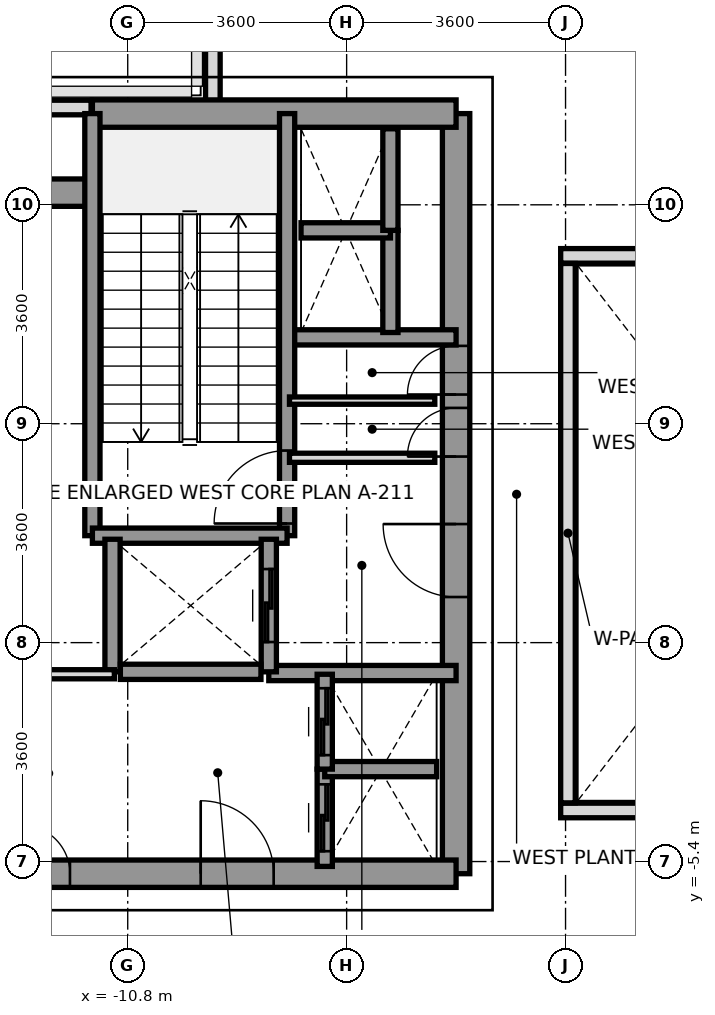
"""IFC4 building model, lengths in metres.
Left out: names, types, materials, properties, quantities, classifications, styles, units other than length and angle.
Written with IfcOpenShell. Run it as: python <this file> out.ifc"""

import sys

from ifc_helpers import new_model, si_unit, direction, frame, frame_2d, origin, place, context, subcontext, project, spatial, rectangle, extrude, source, transform, mapped, element, fill, save


model = new_model("IFC4")
c1 = context("Model", 3, precision=1e-05, world=origin(), true_north=direction((0.0, 1.0)))
c2 = subcontext(c1, "Body", "Model", "MODEL_VIEW")
j1 = project(units=[si_unit("LENGTHUNIT", "METRE"), si_unit("PLANEANGLEUNIT", "RADIAN")], contexts=[c1])
p1 = place(None, origin())
s1 = spatial("IfcSite", under=j1, at=p1, CompositionType="ELEMENT")
p2 = place(p1, origin())
s2 = spatial("IfcBuilding", under=s1, at=p2, CompositionType="ELEMENT")
p3 = place(p2, frame((0.0, 0.0, 151.6)))
s3 = spatial("IfcBuildingStorey", under=s2, at=p3, CompositionType="ELEMENT", Elevation=151.6)
p4 = place(p3, frame((-14.072, 7.0, 0.0), z_axis=(0.0, 0.0, 1.0), x_axis=(1.0, 0.0, 0.0)))
e1 = element("IfcWall", 1, at=p4, inside=s3, PredefinedType="PARAPET", context=c2, shape_type="SweptSolid", body=[
    extrude(rectangle(XDim=2.669, YDim=0.24, at=frame_2d((1.334, 0.0))), origin(), (0.0, 0.0, 1.0), 1.15),
])
p5 = place(p3, frame((-9.4, 6.953, 0.0), z_axis=(0.0, 0.0, 1.0), x_axis=(0.0, 1.0, 0.0)))
e2 = element("IfcWall", 2, at=p5, inside=s3, PredefinedType="PARAPET", context=c2, shape_type="SweptSolid", body=[
    extrude(rectangle(XDim=1.519, YDim=0.24, at=frame_2d((0.76, 0.0))), origin(), (0.0, 0.0, 1.0), 1.15),
])
p6 = place(p3, frame((-5.4, -5.6, 0.0), z_axis=(0.0, 0.0, 1.0), x_axis=(0.0, 1.0, 0.0)))
e3 = element("IfcWall", 3, at=p6, inside=s3, PredefinedType="SHEAR", context=c2, shape_type="SweptSolid", body=[
    extrude(rectangle(XDim=12.5, YDim=0.45, at=frame_2d((6.25, 0.0))), origin(), (0.0, 0.0, 1.0), 4.4),
])
p7 = place(p6, frame((4.55, 0.0, 0.0)))
e4 = element("IfcOpeningElement", 4, at=p7, cuts=e3, PredefinedType="OPENING", context=c2, shape_type="SweptSolid", body=[
    extrude(rectangle(XDim=1.2, YDim=2.2, at=frame_2d((0.6, 1.1))), frame((0.0, 0.235, 0.0), z_axis=(0.0, -1.0, 0.0), x_axis=(1.0, 0.0, 0.0)), (0.0, 0.0, 1.0), 0.47),
])
p8 = place(p6, frame((6.86, 0.0, 0.0)))
e5 = element("IfcOpeningElement", 5, at=p8, cuts=e3, PredefinedType="OPENING", context=c2, shape_type="SweptSolid", body=[
    extrude(rectangle(XDim=0.8, YDim=2.1, at=frame_2d((0.4, 1.05))), frame((0.0, 0.235, 0.0), z_axis=(0.0, -1.0, 0.0), x_axis=(1.0, 0.0, 0.0)), (0.0, 0.0, 1.0), 0.47),
])
p9 = place(p6, frame((7.88, 0.0, 0.0)))
e6 = element("IfcOpeningElement", 6, at=p9, cuts=e3, PredefinedType="OPENING", context=c2, shape_type="SweptSolid", body=[
    extrude(rectangle(XDim=0.8, YDim=2.1, at=frame_2d((0.4, 1.05))), frame((0.0, 0.235, 0.0), z_axis=(0.0, -1.0, 0.0), x_axis=(1.0, 0.0, 0.0)), (0.0, 0.0, 1.0), 0.47),
])
p10 = place(p3, frame((-11.381, 6.9, 0.0), z_axis=(0.0, 0.0, 1.0), x_axis=(1.0, 0.0, 0.0)))
e7 = element("IfcWall", 7, at=p10, inside=s3, PredefinedType="SHEAR", context=c2, shape_type="SweptSolid", body=[
    extrude(rectangle(XDim=5.981, YDim=0.45, at=frame_2d((2.991, 0.0))), origin(), (0.0, 0.0, 1.0), 4.4),
])
p11 = place(p3, frame((-13.2, 5.6, 0.0), z_axis=(0.0, 0.0, 1.0), x_axis=(1.0, 0.0, 0.0)))
e8 = element("IfcWall", 8, at=p11, inside=s3, PredefinedType="SHEAR", context=c2, shape_type="SweptSolid", body=[
    extrude(rectangle(XDim=1.819, YDim=0.45, at=frame_2d((0.909, 0.0))), origin(), (0.0, 0.0, 1.0), 4.4),
])
p12 = place(p3, frame((-13.2, -5.6, 0.0), z_axis=(0.0, 0.0, 1.0), x_axis=(1.0, 0.0, 0.0)))
e9 = element("IfcWall", 9, at=p12, inside=s3, PredefinedType="SHEAR", context=c2, shape_type="SweptSolid", body=[
    extrude(rectangle(XDim=7.8, YDim=0.45, at=frame_2d((3.9, 0.0))), origin(), (0.0, 0.0, 1.0), 4.4),
])
p13 = place(p12, frame((3.6, 0.0, 0.0)))
e10 = element("IfcOpeningElement", 10, at=p13, cuts=e9, PredefinedType="OPENING", context=c2, shape_type="SweptSolid", body=[
    extrude(rectangle(XDim=1.2, YDim=2.2, at=frame_2d((0.6, 1.1))), frame((0.0, 0.235, 0.0), z_axis=(0.0, -1.0, 0.0), x_axis=(1.0, 0.0, 0.0)), (0.0, 0.0, 1.0), 0.47),
])
p14 = place(p12, frame((0.65, 0.0, 0.0)))
e11 = element("IfcOpeningElement", 11, at=p14, cuts=e9, PredefinedType="OPENING", context=c2, shape_type="SweptSolid", body=[
    extrude(rectangle(XDim=0.8, YDim=2.1, at=frame_2d((0.4, 1.05))), frame((0.0, 0.235, 0.0), z_axis=(0.0, -1.0, 0.0), x_axis=(1.0, 0.0, 0.0)), (0.0, 0.0, 1.0), 0.47),
])
p15 = place(p3, frame((-8.18, 3.22, 0.0), z_axis=(0.0, 0.0, 1.0), x_axis=(1.0, 0.0, 0.0)))
e12 = element("IfcWall", 12, at=p15, inside=s3, PredefinedType="SOLIDWALL", context=c2, shape_type="SweptSolid", body=[
    extrude(rectangle(XDim=2.78, YDim=0.25, at=frame_2d((1.39, 0.0))), origin(), (0.0, 0.0, 1.0), 4.4),
])
p16 = place(p3, frame((-8.48, -2.3, 0.0), z_axis=(0.0, 0.0, 1.0), x_axis=(1.0, 0.0, 0.0)))
e13 = element("IfcWall", 13, at=p16, inside=s3, PredefinedType="SOLIDWALL", context=c2, shape_type="SweptSolid", body=[
    extrude(rectangle(XDim=3.08, YDim=0.25, at=frame_2d((1.54, 0.0))), origin(), (0.0, 0.0, 1.0), 4.4),
])
p17 = place(p3, frame((-8.179, -0.041, 0.0), z_axis=(0.0, 0.0, 1.0), x_axis=(0.0, 1.0, 0.0)))
e14 = element("IfcWall", 14, at=p17, inside=s3, PredefinedType="SOLIDWALL", context=c2, shape_type="SweptSolid", body=[
    extrude(rectangle(XDim=6.941, YDim=0.25, at=frame_2d((3.47, 0.0))), origin(), (0.0, 0.0, 1.0), 4.4),
])
p18 = place(p17, frame((0.2, 0.0, 0.0)))
e15 = element("IfcOpeningElement", 15, at=p18, cuts=e14, PredefinedType="OPENING", context=c2, shape_type="SweptSolid", body=[
    extrude(rectangle(XDim=1.2, YDim=2.2, at=frame_2d((0.6, 1.1))), frame((0.0, 0.135, 0.0), z_axis=(0.0, -1.0, 0.0), x_axis=(1.0, 0.0, 0.0)), (0.0, 0.0, 1.0), 0.27),
])
p19 = place(p3, frame((-11.381, -0.041, 0.0), z_axis=(0.0, 0.0, 1.0), x_axis=(0.0, 1.0, 0.0)))
e16 = element("IfcWall", 16, at=p19, inside=s3, PredefinedType="SOLIDWALL", context=c2, shape_type="SweptSolid", body=[
    extrude(rectangle(XDim=6.941, YDim=0.25, at=frame_2d((3.47, 0.0))), origin(), (0.0, 0.0, 1.0), 4.4),
])
p20 = place(p3, frame((-11.381, -0.041, 0.0), z_axis=(0.0, 0.0, 1.0), x_axis=(1.0, 0.0, 0.0)))
e17 = element("IfcWall", 17, at=p20, inside=s3, PredefinedType="SOLIDWALL", context=c2, shape_type="SweptSolid", body=[
    extrude(rectangle(XDim=3.202, YDim=0.25, at=frame_2d((1.601, 0.0))), origin(), (0.0, 0.0, 1.0), 4.4),
])
p21 = place(p3, frame((-11.05, -2.28, 0.0), z_axis=(0.0, 0.0, 1.0), x_axis=(0.0, 1.0, 0.0)))
e18 = element("IfcWall", 18, at=p21, inside=s3, PredefinedType="SOLIDWALL", context=c2, shape_type="SweptSolid", body=[
    extrude(rectangle(XDim=2.18, YDim=0.25, at=frame_2d((1.09, 0.0))), origin(), (0.0, 0.0, 1.0), 4.4),
])
p22 = place(p3, frame((-8.48, -2.28, 0.0), z_axis=(0.0, 0.0, 1.0), x_axis=(0.0, 1.0, 0.0)))
e19 = element("IfcWall", 19, at=p22, inside=s3, PredefinedType="SOLIDWALL", context=c2, shape_type="SweptSolid", body=[
    extrude(rectangle(XDim=2.18, YDim=0.25, at=frame_2d((1.09, 0.0))), origin(), (0.0, 0.0, 1.0), 4.4),
])
p23 = place(p22, frame((0.49, 0.0, 0.0)))
e20 = element("IfcOpeningElement", 20, at=p23, cuts=e19, PredefinedType="OPENING", context=c2, shape_type="SweptSolid", body=[
    extrude(rectangle(XDim=1.2, YDim=2.2, at=frame_2d((0.6, 1.1))), frame((0.0, 0.135, 0.0), z_axis=(0.0, -1.0, 0.0), x_axis=(1.0, 0.0, 0.0)), (0.0, 0.0, 1.0), 0.27),
])
p24 = place(p3, frame((-10.921, -2.28, 0.0), z_axis=(0.0, 0.0, 1.0), x_axis=(1.0, 0.0, 0.0)))
e21 = element("IfcWall", 21, at=p24, inside=s3, PredefinedType="SOLIDWALL", context=c2, shape_type="SweptSolid", body=[
    extrude(rectangle(XDim=2.312, YDim=0.25, at=frame_2d((1.156, 0.0))), origin(), (0.0, 0.0, 1.0), 4.4),
])
p25 = place(p3, frame((-7.56, -5.48, 0.0), z_axis=(0.0, 0.0, 1.0), x_axis=(0.0, 1.0, 0.0)))
e22 = element("IfcWall", 22, at=p25, inside=s3, PredefinedType="SOLIDWALL", context=c2, shape_type="SweptSolid", body=[
    extrude(rectangle(XDim=1.6, YDim=0.25, at=frame_2d((0.8, 0.0))), origin(), (0.0, 0.0, 1.0), 4.4),
])
p26 = place(p25, frame((0.25, 0.0, 0.0)))
e23 = element("IfcOpeningElement", 23, at=p26, cuts=e22, PredefinedType="OPENING", context=c2, shape_type="SweptSolid", body=[
    extrude(rectangle(XDim=1.1, YDim=2.2, at=frame_2d((0.55, 1.1))), frame((0.0, 0.135, 0.0), z_axis=(0.0, -1.0, 0.0), x_axis=(1.0, 0.0, 0.0)), (0.0, 0.0, 1.0), 0.27),
])
p27 = place(p3, frame((-7.56, -3.88, 0.0), z_axis=(0.0, 0.0, 1.0), x_axis=(1.0, 0.0, 0.0)))
e24 = element("IfcWall", 24, at=p27, inside=s3, PredefinedType="SOLIDWALL", context=c2, shape_type="SweptSolid", body=[
    extrude(rectangle(XDim=1.84, YDim=0.25, at=frame_2d((0.92, 0.0))), origin(), (0.0, 0.0, 1.0), 4.4),
])
p28 = place(p3, frame((-7.56, -3.88, 0.0), z_axis=(0.0, 0.0, 1.0), x_axis=(0.0, 1.0, 0.0)))
e25 = element("IfcWall", 25, at=p28, inside=s3, PredefinedType="SOLIDWALL", context=c2, shape_type="SweptSolid", body=[
    extrude(rectangle(XDim=1.56, YDim=0.25, at=frame_2d((0.78, 0.0))), origin(), (0.0, 0.0, 1.0), 4.4),
])
p29 = place(p28, frame((0.23, 0.0, 0.0)))
e26 = element("IfcOpeningElement", 26, at=p29, cuts=e25, PredefinedType="OPENING", context=c2, shape_type="SweptSolid", body=[
    extrude(rectangle(XDim=1.1, YDim=2.2, at=frame_2d((0.55, 1.1))), frame((0.0, 0.135, 0.0), z_axis=(0.0, -1.0, 0.0), x_axis=(1.0, 0.0, 0.0)), (0.0, 0.0, 1.0), 0.27),
])
p30 = place(p3, frame((-6.48, 3.3, 0.0), z_axis=(0.0, 0.0, 1.0), x_axis=(0.0, 1.0, 0.0)))
e27 = element("IfcWall", 27, at=p30, inside=s3, PredefinedType="SOLIDWALL", context=c2, shape_type="SweptSolid", body=[
    extrude(rectangle(XDim=1.68, YDim=0.25, at=frame_2d((0.84, 0.0))), origin(), (0.0, 0.0, 1.0), 4.4),
])
p31 = place(p3, frame((-7.95, 4.98, 0.0), z_axis=(0.0, 0.0, 1.0), x_axis=(1.0, 0.0, 0.0)))
e28 = element("IfcWall", 28, at=p31, inside=s3, PredefinedType="SOLIDWALL", context=c2, shape_type="SweptSolid", body=[
    extrude(rectangle(XDim=1.47, YDim=0.25, at=frame_2d((0.735, 0.0))), origin(), (0.0, 0.0, 1.0), 4.4),
])
p32 = place(p3, frame((-6.48, 4.98, 0.0), z_axis=(0.0, 0.0, 1.0), x_axis=(0.0, 1.0, 0.0)))
e29 = element("IfcWall", 29, at=p32, inside=s3, PredefinedType="SOLIDWALL", context=c2, shape_type="SweptSolid", body=[
    extrude(rectangle(XDim=1.67, YDim=0.25, at=frame_2d((0.835, 0.0))), origin(), (0.0, 0.0, 1.0), 4.4),
])
p33 = place(p3, frame((-8.14, 1.24, 0.0), z_axis=(0.0, 0.0, 1.0), x_axis=(1.0, 0.0, 0.0)))
e30 = element("IfcWall", 30, at=p33, inside=s3, PredefinedType="PARTITIONING", context=c2, shape_type="SweptSolid", body=[
    extrude(rectangle(XDim=2.39, YDim=0.15, at=frame_2d((1.195, 0.0))), origin(), (0.0, 0.0, 1.0), 3.5),
])
p34 = place(p3, frame((-8.14, 2.18, 0.0), z_axis=(0.0, 0.0, 1.0), x_axis=(1.0, 0.0, 0.0)))
e31 = element("IfcWall", 31, at=p34, inside=s3, PredefinedType="PARTITIONING", context=c2, shape_type="SweptSolid", body=[
    extrude(rectangle(XDim=2.39, YDim=0.12, at=frame_2d((1.195, 0.0))), origin(), (0.0, 0.0, 1.0), 3.5),
])
p35 = place(p3, frame((-13.2, -2.32, 0.0), z_axis=(0.0, 0.0, 1.0), x_axis=(1.0, 0.0, 0.0)))
e32 = element("IfcWall", 32, at=p35, inside=s3, PredefinedType="PARTITIONING", context=c2, shape_type="SweptSolid", body=[
    extrude(rectangle(XDim=2.18, YDim=0.15, at=frame_2d((1.09, 0.0))), origin(), (0.0, 0.0, 1.0), 4.4),
])
for number, where, z_axis, x_axis in (
    (33, (-3.68, -4.56, 0.0), (0.0, 0.0, 1.0), (1.0, 0.0, 0.0)),
    (34, (-3.68, 4.56, 0.0), (0.0, 0.0, 1.0), (1.0, 0.0, 0.0)),
):
    element("IfcWall", number, at=place(p3, frame(where, z_axis=z_axis, x_axis=x_axis)), inside=s3, PredefinedType="PARAPET", context=c2, shape_type="SweptSolid", body=[
        extrude(rectangle(XDim=7.36, YDim=0.24, at=frame_2d((3.68, 0.0))), origin(), (0.0, 0.0, 1.0), 1.15),
    ])
p36 = place(p3, frame((-3.56, -4.435, 0.0), z_axis=(0.0, 0.0, 1.0), x_axis=(0.0, 1.0, 0.0)))
e35 = element("IfcWall", 35, at=p36, inside=s3, PredefinedType="PARAPET", context=c2, shape_type="SweptSolid", body=[
    extrude(rectangle(XDim=8.87, YDim=0.24, at=frame_2d((4.435, 0.0))), origin(), (0.0, 0.0, 1.0), 1.15),
])
m1 = source(origin(), c2, "Body", "SweptSolid", [
    extrude(rectangle(XDim=1.2, YDim=2.2, at=frame_2d((0.6, 1.1))), frame((0.0, 0.025, 0.0), z_axis=(0.0, -1.0, 0.0), x_axis=(1.0, 0.0, 0.0)), (0.0, 0.0, 1.0), 0.05),
])
p37 = place(p18, origin())
e36 = element("IfcDoor", 36, at=p37, inside=s3, OperationType="SINGLE_SWING_LEFT", PredefinedType="DOOR", context=c2, shape_type="MappedRepresentation", body=[
    mapped(m1, transform((0.0, 0.0, 0.0), x_axis=(1.0, 0.0, 0.0), y_axis=(0.0, 1.0, 0.0), z_axis=(0.0, 0.0, 1.0), scale=1.0)),
])
fill(e15, e36)
p38 = place(p7, origin())
e37 = element("IfcDoor", 37, at=p38, inside=s3, OperationType="SINGLE_SWING_RIGHT", PredefinedType="DOOR", context=c2, shape_type="MappedRepresentation", body=[
    mapped(m1, transform((0.0, 0.0, 0.0), x_axis=(1.0, 0.0, 0.0), y_axis=(0.0, 1.0, 0.0), z_axis=(0.0, 0.0, 1.0), scale=1.0)),
])
fill(e4, e37)
p39 = place(p13, origin())
e38 = element("IfcDoor", 38, at=p39, inside=s3, OperationType="SINGLE_SWING_LEFT", PredefinedType="DOOR", context=c2, shape_type="MappedRepresentation", body=[
    mapped(m1, transform((0.0, 0.0, 0.0), x_axis=(1.0, 0.0, 0.0), y_axis=(0.0, 1.0, 0.0), z_axis=(0.0, 0.0, 1.0), scale=1.0)),
])
fill(e10, e38)
m2 = source(origin(), c2, "Body", "SweptSolid", [
    extrude(rectangle(XDim=0.8, YDim=2.1, at=frame_2d((0.4, 1.05))), frame((0.0, 0.025, 0.0), z_axis=(0.0, -1.0, 0.0), x_axis=(1.0, 0.0, 0.0)), (0.0, 0.0, 1.0), 0.05),
])
p40 = place(p8, origin())
e39 = element("IfcDoor", 39, at=p40, inside=s3, OperationType="SINGLE_SWING_LEFT", PredefinedType="DOOR", context=c2, shape_type="MappedRepresentation", body=[
    mapped(m2, transform((0.0, 0.0, 0.0), x_axis=(1.0, 0.0, 0.0), y_axis=(0.0, 1.0, 0.0), z_axis=(0.0, 0.0, 1.0), scale=1.0)),
])
fill(e5, e39)
p41 = place(p9, origin())
e40 = element("IfcDoor", 40, at=p41, inside=s3, OperationType="SINGLE_SWING_LEFT", PredefinedType="DOOR", context=c2, shape_type="MappedRepresentation", body=[
    mapped(m2, transform((0.0, 0.0, 0.0), x_axis=(1.0, 0.0, 0.0), y_axis=(0.0, 1.0, 0.0), z_axis=(0.0, 0.0, 1.0), scale=1.0)),
])
fill(e6, e40)
p42 = place(p14, origin())
e41 = element("IfcDoor", 41, at=p42, inside=s3, OperationType="SINGLE_SWING_LEFT", PredefinedType="DOOR", context=c2, shape_type="MappedRepresentation", body=[
    mapped(m2, transform((0.0, 0.0, 0.0), x_axis=(1.0, 0.0, 0.0), y_axis=(0.0, 1.0, 0.0), z_axis=(0.0, 0.0, 1.0), scale=1.0)),
])
fill(e11, e41)
p43 = place(p23, origin())
e42 = element("IfcDoor", 42, at=p43, inside=s3, OperationType="SLIDING_TO_RIGHT", PredefinedType="DOOR", context=c2, shape_type="MappedRepresentation", body=[
    mapped(m1, transform((0.0, 0.0, 0.0), x_axis=(1.0, 0.0, 0.0), y_axis=(0.0, 1.0, 0.0), z_axis=(0.0, 0.0, 1.0), scale=1.0)),
])
fill(e20, e42)
m3 = source(origin(), c2, "Body", "SweptSolid", [
    extrude(rectangle(XDim=1.1, YDim=2.2, at=frame_2d((0.55, 1.1))), frame((0.0, 0.025, 0.0), z_axis=(0.0, -1.0, 0.0), x_axis=(1.0, 0.0, 0.0)), (0.0, 0.0, 1.0), 0.05),
])
p44 = place(p26, origin())
e43 = element("IfcDoor", 43, at=p44, inside=s3, OperationType="SLIDING_TO_LEFT", PredefinedType="DOOR", context=c2, shape_type="MappedRepresentation", body=[
    mapped(m3, transform((0.0, 0.0, 0.0), x_axis=(1.0, 0.0, 0.0), y_axis=(0.0, 1.0, 0.0), z_axis=(0.0, 0.0, 1.0), scale=1.0)),
])
fill(e23, e43)
p45 = place(p29, origin())
e44 = element("IfcDoor", 44, at=p45, inside=s3, OperationType="SLIDING_TO_LEFT", PredefinedType="DOOR", context=c2, shape_type="MappedRepresentation", body=[
    mapped(m3, transform((0.0, 0.0, 0.0), x_axis=(1.0, 0.0, 0.0), y_axis=(0.0, 1.0, 0.0), z_axis=(0.0, 0.0, 1.0), scale=1.0)),
])
fill(e26, e44)
save(model, sys.argv[1])
